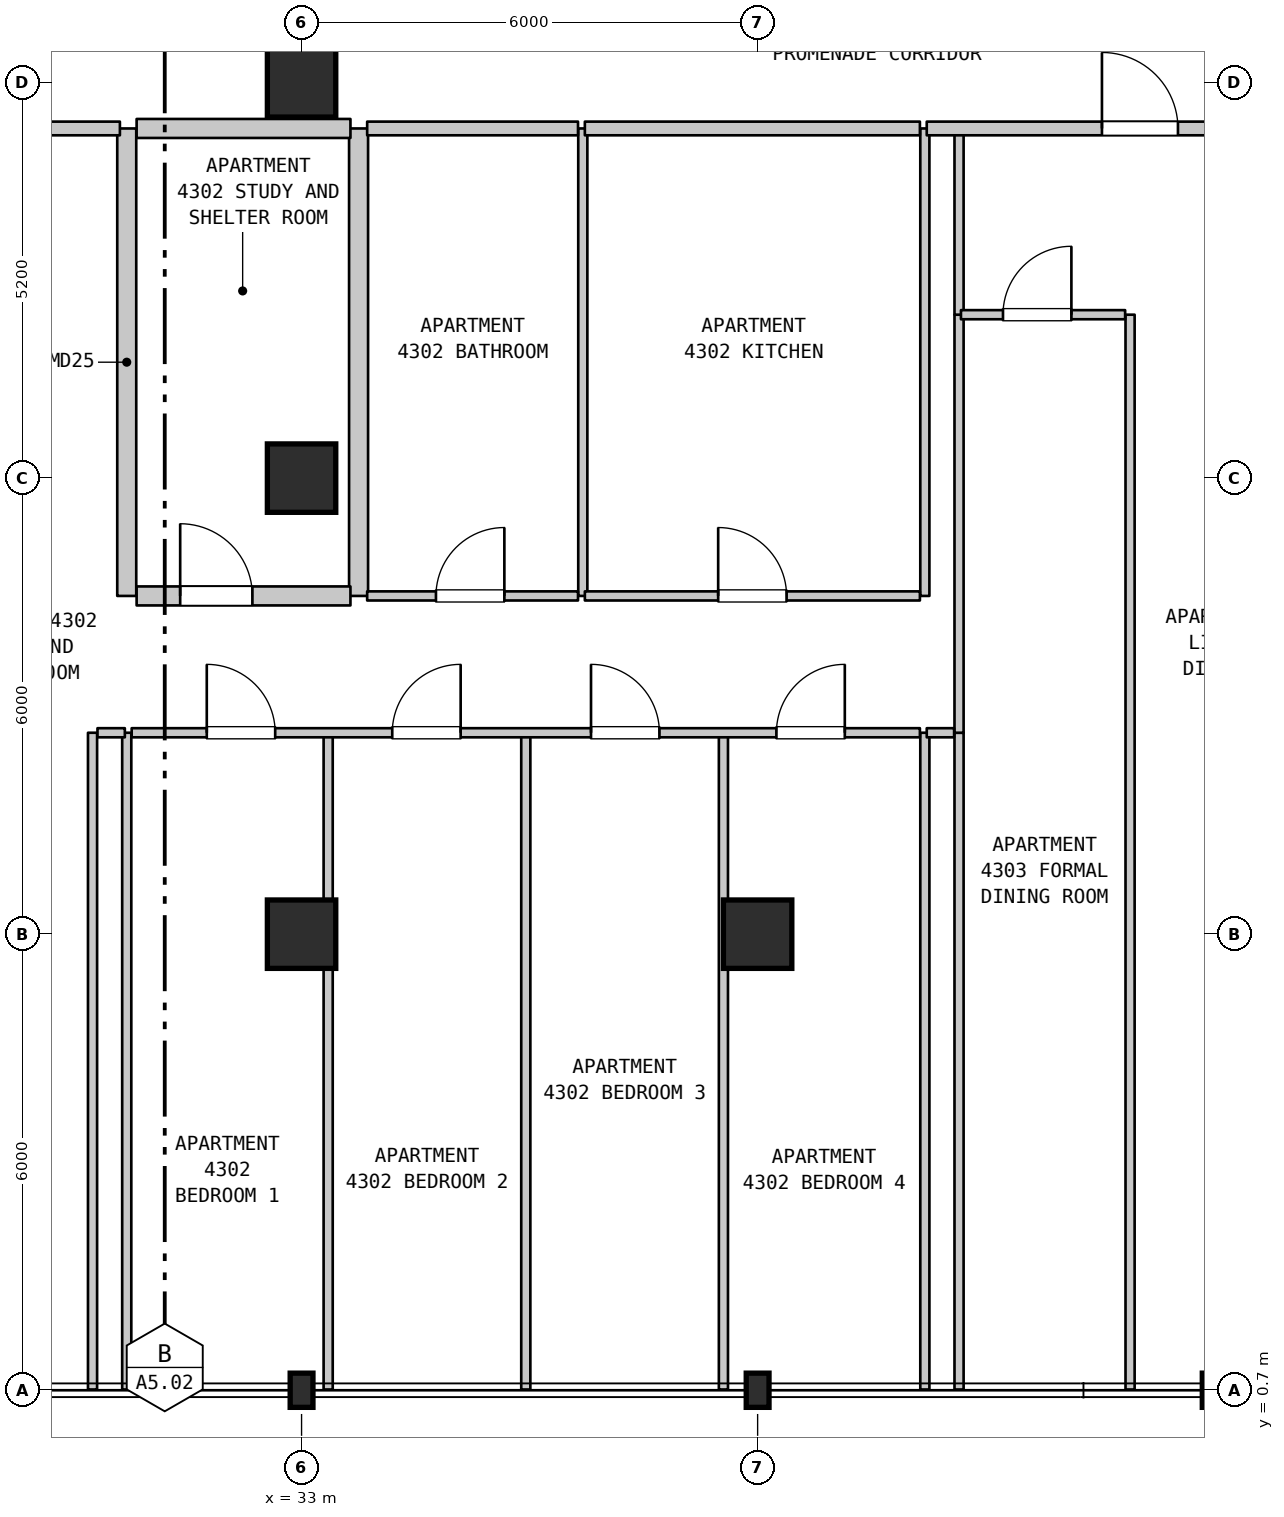
"""IFC4 building model, lengths in metres.
Left out: names, types, materials, properties, quantities, classifications, styles, units other than length and angle.
Written with IfcOpenShell. Run it as: python <this file> out.ifc"""

import sys

from ifc_helpers import new_model, si_unit, direction, frame, frame_2d, origin, origin_2d, place, context, subcontext, project, spatial, rectangle, i_section, extrude, element, fill, save


model = new_model("IFC4")
c1 = context("Model", 3, precision=1e-05, world=origin(), true_north=direction((0.0, 1.0)))
c2 = subcontext(c1, "Body", "Model", "MODEL_VIEW")
j1 = project(units=[si_unit("LENGTHUNIT", "METRE"), si_unit("PLANEANGLEUNIT", "RADIAN")], contexts=[c1])
p1 = place(None, origin())
s1 = spatial("IfcSite", under=j1, at=p1, CompositionType="ELEMENT")
p2 = place(p1, origin())
s2 = spatial("IfcBuilding", under=s1, at=p2, CompositionType="ELEMENT")
p3 = place(p2, frame((0.0, 0.0, 176.5)))
s3 = spatial("IfcBuildingStorey", under=s2, at=p3, CompositionType="ELEMENT", Elevation=176.5)
p4 = place(p3, frame((33.0, 0.7, 0.0), z_axis=(0.0, 0.0, 1.0), x_axis=(1.0, 0.0, 0.0)))
e1 = element("IfcColumn", 1, at=p4, inside=s3, PredefinedType="COLUMN", context=c2, shape_type="SweptSolid", body=[
    extrude(i_section(OverallWidth=0.3, OverallDepth=0.45, WebThickness=0.014, FlangeThickness=0.026, FilletRadius=0.027, at=origin_2d()), origin(), (0.0, 0.0, 1.0), 3.7),
])
for number, where, z_axis, x_axis in (
    (2, (33.0, 6.7, 0.0), (0.0, 0.0, 1.0), (1.0, 0.0, 0.0)),
    (3, (33.0, 12.7, 0.0), (0.0, 0.0, 1.0), (1.0, 0.0, 0.0)),
    (4, (33.0, 17.9, 0.0), (0.0, 0.0, 1.0), (1.0, 0.0, 0.0)),
):
    element("IfcColumn", number, at=place(p3, frame(where, z_axis=z_axis, x_axis=x_axis)), inside=s3, PredefinedType="COLUMN", context=c2, shape_type="SweptSolid", body=[
        extrude(rectangle(XDim=0.9, YDim=0.9, at=origin_2d()), origin(), (0.0, 0.0, 1.0), 3.7),
    ])
p5 = place(p3, frame((39.0, 0.7, 0.0), z_axis=(0.0, 0.0, 1.0), x_axis=(1.0, 0.0, 0.0)))
e5 = element("IfcColumn", 5, at=p5, inside=s3, PredefinedType="COLUMN", context=c2, shape_type="SweptSolid", body=[
    extrude(i_section(OverallWidth=0.3, OverallDepth=0.45, WebThickness=0.014, FlangeThickness=0.026, FilletRadius=0.027, at=origin_2d()), origin(), (0.0, 0.0, 1.0), 3.7),
])
p6 = place(p3, frame((39.0, 6.7, 0.0), z_axis=(0.0, 0.0, 1.0), x_axis=(1.0, 0.0, 0.0)))
e6 = element("IfcColumn", 6, at=p6, inside=s3, PredefinedType="COLUMN", context=c2, shape_type="SweptSolid", body=[
    extrude(rectangle(XDim=0.9, YDim=0.9, at=origin_2d()), origin(), (0.0, 0.0, 1.0), 3.7),
])
p7 = place(p3, frame((45.0, 0.7, 0.0), z_axis=(0.0, 0.0, 1.0), x_axis=(1.0, 0.0, 0.0)))
e7 = element("IfcColumn", 7, at=p7, inside=s3, PredefinedType="COLUMN", context=c2, shape_type="SweptSolid", body=[
    extrude(i_section(OverallWidth=0.3, OverallDepth=0.45, WebThickness=0.014, FlangeThickness=0.026, FilletRadius=0.027, at=origin_2d()), origin(), (0.0, 0.0, 1.0), 3.7),
])
for number, where, z_axis, x_axis in (
    (8, (30.25, 0.71, 0.0), (0.0, 0.0, 1.0), (0.0, 1.0, 0.0)),
    (9, (30.7, 0.71, 0.0), (0.0, 0.0, 1.0), (0.0, 1.0, 0.0)),
):
    element("IfcWall", number, at=place(p3, frame(where, z_axis=z_axis, x_axis=x_axis)), inside=s3, PredefinedType="PARTITIONING", context=c2, shape_type="SweptSolid", body=[
        extrude(rectangle(XDim=8.64, YDim=0.12, at=frame_2d((4.32, 0.0))), origin(), (0.0, 0.0, 1.0), 3.39),
    ])
p8 = place(p3, frame((30.7, 11.15, 0.0), z_axis=(0.0, 0.0, 1.0), x_axis=(0.0, 1.0, 0.0)))
e10 = element("IfcWall", 10, at=p8, inside=s3, PredefinedType="STANDARD", context=c2, shape_type="SweptSolid", body=[
    extrude(rectangle(XDim=6.15, YDim=0.25, at=frame_2d((3.075, 0.0))), origin(), (0.0, 0.0, 1.0), 3.39),
])
p9 = place(p3, frame((33.35, 0.71, 0.0), z_axis=(0.0, 0.0, 1.0), x_axis=(0.0, 1.0, 0.0)))
e11 = element("IfcWall", 11, at=p9, inside=s3, PredefinedType="PARTITIONING", context=c2, shape_type="SweptSolid", body=[
    extrude(rectangle(XDim=8.64, YDim=0.12, at=frame_2d((4.32, 0.0))), origin(), (0.0, 0.0, 1.0), 3.39),
])
p10 = place(p3, frame((33.75, 11.15, 0.0), z_axis=(0.0, 0.0, 1.0), x_axis=(0.0, 1.0, 0.0)))
e12 = element("IfcWall", 12, at=p10, inside=s3, PredefinedType="STANDARD", context=c2, shape_type="SweptSolid", body=[
    extrude(rectangle(XDim=6.15, YDim=0.25, at=frame_2d((3.075, 0.0))), origin(), (0.0, 0.0, 1.0), 3.39),
])
p11 = place(p3, frame((35.95, 0.71, 0.0), z_axis=(0.0, 0.0, 1.0), x_axis=(0.0, 1.0, 0.0)))
e13 = element("IfcWall", 13, at=p11, inside=s3, PredefinedType="PARTITIONING", context=c2, shape_type="SweptSolid", body=[
    extrude(rectangle(XDim=8.64, YDim=0.12, at=frame_2d((4.32, 0.0))), origin(), (0.0, 0.0, 1.0), 3.39),
])
p12 = place(p3, frame((36.7, 11.15, 0.0), z_axis=(0.0, 0.0, 1.0), x_axis=(0.0, 1.0, 0.0)))
e14 = element("IfcWall", 14, at=p12, inside=s3, PredefinedType="PARTITIONING", context=c2, shape_type="SweptSolid", body=[
    extrude(rectangle(XDim=6.15, YDim=0.12, at=frame_2d((3.075, 0.0))), origin(), (0.0, 0.0, 1.0), 3.39),
])
for number, where, z_axis, x_axis in (
    (15, (38.55, 0.71, 0.0), (0.0, 0.0, 1.0), (0.0, 1.0, 0.0)),
    (16, (41.2, 0.71, 0.0), (0.0, 0.0, 1.0), (0.0, 1.0, 0.0)),
):
    element("IfcWall", number, at=place(p3, frame(where, z_axis=z_axis, x_axis=x_axis)), inside=s3, PredefinedType="PARTITIONING", context=c2, shape_type="SweptSolid", body=[
        extrude(rectangle(XDim=8.64, YDim=0.12, at=frame_2d((4.32, 0.0))), origin(), (0.0, 0.0, 1.0), 3.39),
    ])
p13 = place(p3, frame((41.2, 11.15, 0.0), z_axis=(0.0, 0.0, 1.0), x_axis=(0.0, 1.0, 0.0)))
e17 = element("IfcWall", 17, at=p13, inside=s3, PredefinedType="PARTITIONING", context=c2, shape_type="SweptSolid", body=[
    extrude(rectangle(XDim=6.15, YDim=0.12, at=frame_2d((3.075, 0.0))), origin(), (0.0, 0.0, 1.0), 3.39),
])
p14 = place(p3, frame((41.65, 0.71, 0.0), z_axis=(0.0, 0.0, 1.0), x_axis=(0.0, 1.0, 0.0)))
e18 = element("IfcWall", 18, at=p14, inside=s3, PredefinedType="PARTITIONING", context=c2, shape_type="SweptSolid", body=[
    extrude(rectangle(XDim=8.64, YDim=0.12, at=frame_2d((4.32, 0.0))), origin(), (0.0, 0.0, 1.0), 3.39),
])
p15 = place(p3, frame((41.65, 9.35, 0.0), z_axis=(0.0, 0.0, 1.0), x_axis=(0.0, 1.0, 0.0)))
e19 = element("IfcWall", 19, at=p15, inside=s3, PredefinedType="PARTITIONING", context=c2, shape_type="SweptSolid", body=[
    extrude(rectangle(XDim=5.5, YDim=0.12, at=frame_2d((2.75, 0.0))), origin(), (0.0, 0.0, 1.0), 3.39),
])
p16 = place(p3, frame((41.65, 14.85, 0.0), z_axis=(0.0, 0.0, 1.0), x_axis=(0.0, 1.0, 0.0)))
e20 = element("IfcWall", 20, at=p16, inside=s3, PredefinedType="PARTITIONING", context=c2, shape_type="SweptSolid", body=[
    extrude(rectangle(XDim=2.45, YDim=0.12, at=frame_2d((1.225, 0.0))), origin(), (0.0, 0.0, 1.0), 3.39),
])
p17 = place(p3, frame((43.9, 0.71, 0.0), z_axis=(0.0, 0.0, 1.0), x_axis=(0.0, 1.0, 0.0)))
e21 = element("IfcWall", 21, at=p17, inside=s3, PredefinedType="PARTITIONING", context=c2, shape_type="SweptSolid", body=[
    extrude(rectangle(XDim=14.14, YDim=0.12, at=frame_2d((7.07, 0.0))), origin(), (0.0, 0.0, 1.0), 3.39),
])
p18 = place(p3, frame((30.315, 9.35, 0.0), z_axis=(0.0, 0.0, 1.0), x_axis=(1.0, 0.0, 0.0)))
e22 = element("IfcWall", 22, at=p18, inside=s3, PredefinedType="PARTITIONING", context=c2, shape_type="SweptSolid", body=[
    extrude(rectangle(XDim=0.36, YDim=0.12, at=frame_2d((0.18, 0.0))), origin(), (0.0, 0.0, 1.0), 3.39),
])
p19 = place(p3, frame((30.765, 9.35, 0.0), z_axis=(0.0, 0.0, 1.0), x_axis=(1.0, 0.0, 0.0)))
e23 = element("IfcWall", 23, at=p19, inside=s3, PredefinedType="PARTITIONING", context=c2, shape_type="SweptSolid", body=[
    extrude(rectangle(XDim=10.37, YDim=0.12, at=frame_2d((5.185, 0.0))), origin(), (0.0, 0.0, 1.0), 3.39),
])
p20 = place(p19, frame((0.988, 0.0, 0.0)))
e24 = element("IfcOpeningElement", 24, at=p20, cuts=e23, PredefinedType="OPENING", context=c2, shape_type="SweptSolid", body=[
    extrude(rectangle(XDim=0.9, YDim=2.15, at=frame_2d((0.45, 1.075))), frame((0.0, 0.07, 0.0), z_axis=(0.0, -1.0, 0.0), x_axis=(1.0, 0.0, 0.0)), (0.0, 0.0, 1.0), 0.14),
])
p21 = place(p19, frame((3.428, 0.0, 0.0)))
e25 = element("IfcOpeningElement", 25, at=p21, cuts=e23, PredefinedType="OPENING", context=c2, shape_type="SweptSolid", body=[
    extrude(rectangle(XDim=0.9, YDim=2.15, at=frame_2d((0.45, 1.075))), frame((0.0, 0.07, 0.0), z_axis=(0.0, -1.0, 0.0), x_axis=(1.0, 0.0, 0.0)), (0.0, 0.0, 1.0), 0.14),
])
p22 = place(p19, frame((6.043, 0.0, 0.0)))
e26 = element("IfcOpeningElement", 26, at=p22, cuts=e23, PredefinedType="OPENING", context=c2, shape_type="SweptSolid", body=[
    extrude(rectangle(XDim=0.9, YDim=2.15, at=frame_2d((0.45, 1.075))), frame((0.0, 0.07, 0.0), z_axis=(0.0, -1.0, 0.0), x_axis=(1.0, 0.0, 0.0)), (0.0, 0.0, 1.0), 0.14),
])
p23 = place(p19, frame((8.482, 0.0, 0.0)))
e27 = element("IfcOpeningElement", 27, at=p23, cuts=e23, PredefinedType="OPENING", context=c2, shape_type="SweptSolid", body=[
    extrude(rectangle(XDim=0.9, YDim=2.15, at=frame_2d((0.45, 1.075))), frame((0.0, 0.07, 0.0), z_axis=(0.0, -1.0, 0.0), x_axis=(1.0, 0.0, 0.0)), (0.0, 0.0, 1.0), 0.14),
])
p24 = place(p3, frame((41.225, 9.35, 0.0), z_axis=(0.0, 0.0, 1.0), x_axis=(1.0, 0.0, 0.0)))
e28 = element("IfcWall", 28, at=p24, inside=s3, PredefinedType="PARTITIONING", context=c2, shape_type="SweptSolid", body=[
    extrude(rectangle(XDim=0.36, YDim=0.12, at=frame_2d((0.18, 0.0))), origin(), (0.0, 0.0, 1.0), 3.39),
])
p25 = place(p3, frame((30.83, 11.15, 0.0), z_axis=(0.0, 0.0, 1.0), x_axis=(1.0, 0.0, 0.0)))
e29 = element("IfcWall", 29, at=p25, inside=s3, PredefinedType="STANDARD", context=c2, shape_type="SweptSolid", body=[
    extrude(rectangle(XDim=2.813, YDim=0.25, at=frame_2d((1.406, 0.0))), origin(), (0.0, 0.0, 1.0), 3.39),
])
p26 = place(p25, frame((0.573, 0.0, 0.0)))
e30 = element("IfcOpeningElement", 30, at=p26, cuts=e29, PredefinedType="OPENING", context=c2, shape_type="SweptSolid", body=[
    extrude(rectangle(XDim=0.95, YDim=2.15, at=frame_2d((0.475, 1.075))), frame((0.0, 0.135, 0.0), z_axis=(0.0, -1.0, 0.0), x_axis=(1.0, 0.0, 0.0)), (0.0, 0.0, 1.0), 0.27),
])
p27 = place(p3, frame((33.863, 11.15, 0.0), z_axis=(0.0, 0.0, 1.0), x_axis=(1.0, 0.0, 0.0)))
e31 = element("IfcWall", 31, at=p27, inside=s3, PredefinedType="PARTITIONING", context=c2, shape_type="SweptSolid", body=[
    extrude(rectangle(XDim=2.774, YDim=0.12, at=frame_2d((1.387, 0.0))), origin(), (0.0, 0.0, 1.0), 3.39),
])
p28 = place(p27, frame((0.905, 0.0, 0.0)))
e32 = element("IfcOpeningElement", 32, at=p28, cuts=e31, PredefinedType="OPENING", context=c2, shape_type="SweptSolid", body=[
    extrude(rectangle(XDim=0.9, YDim=2.1, at=frame_2d((0.45, 1.05))), frame((0.0, 0.07, 0.0), z_axis=(0.0, -1.0, 0.0), x_axis=(1.0, 0.0, 0.0)), (0.0, 0.0, 1.0), 0.14),
])
p29 = place(p3, frame((36.727, 11.15, 0.0), z_axis=(0.0, 0.0, 1.0), x_axis=(1.0, 0.0, 0.0)))
e33 = element("IfcWall", 33, at=p29, inside=s3, PredefinedType="PARTITIONING", context=c2, shape_type="SweptSolid", body=[
    extrude(rectangle(XDim=4.408, YDim=0.12, at=frame_2d((2.204, 0.0))), origin(), (0.0, 0.0, 1.0), 3.39),
])
p30 = place(p29, frame((1.754, 0.0, 0.0)))
e34 = element("IfcOpeningElement", 34, at=p30, cuts=e33, PredefinedType="OPENING", context=c2, shape_type="SweptSolid", body=[
    extrude(rectangle(XDim=0.9, YDim=2.15, at=frame_2d((0.45, 1.075))), frame((0.0, 0.07, 0.0), z_axis=(0.0, -1.0, 0.0), x_axis=(1.0, 0.0, 0.0)), (0.0, 0.0, 1.0), 0.14),
])
p31 = place(p3, frame((41.675, 14.85, 0.0), z_axis=(0.0, 0.0, 1.0), x_axis=(1.0, 0.0, 0.0)))
e35 = element("IfcWall", 35, at=p31, inside=s3, PredefinedType="PARTITIONING", context=c2, shape_type="SweptSolid", body=[
    extrude(rectangle(XDim=2.16, YDim=0.12, at=frame_2d((1.08, 0.0))), origin(), (0.0, 0.0, 1.0), 3.39),
])
p32 = place(p31, frame((0.553, 0.0, 0.0)))
e36 = element("IfcOpeningElement", 36, at=p32, cuts=e35, PredefinedType="OPENING", context=c2, shape_type="SweptSolid", body=[
    extrude(rectangle(XDim=0.9, YDim=2.15, at=frame_2d((0.45, 1.075))), frame((0.0, 0.07, 0.0), z_axis=(0.0, -1.0, 0.0), x_axis=(1.0, 0.0, 0.0)), (0.0, 0.0, 1.0), 0.14),
])
p33 = place(p3, frame((25.515, 17.3, 0.0), z_axis=(0.0, 0.0, 1.0), x_axis=(1.0, 0.0, 0.0)))
e37 = element("IfcWall", 37, at=p33, inside=s3, PredefinedType="STANDARD", context=c2, shape_type="SweptSolid", body=[
    extrude(rectangle(XDim=5.095, YDim=0.18, at=frame_2d((2.548, 0.0))), origin(), (0.0, 0.0, 1.0), 3.39),
])
p34 = place(p33, frame((2.08, 0.0, 0.0)))
e38 = element("IfcOpeningElement", 38, at=p34, cuts=e37, PredefinedType="OPENING", context=c2, shape_type="SweptSolid", body=[
    extrude(rectangle(XDim=1.0, YDim=2.15, at=frame_2d((0.5, 1.075))), frame((0.0, 0.1, 0.0), z_axis=(0.0, -1.0, 0.0), x_axis=(1.0, 0.0, 0.0)), (0.0, 0.0, 1.0), 0.2),
])
p35 = place(p3, frame((30.83, 17.3, 0.0), z_axis=(0.0, 0.0, 1.0), x_axis=(1.0, 0.0, 0.0)))
e39 = element("IfcWall", 39, at=p35, inside=s3, PredefinedType="STANDARD", context=c2, shape_type="SweptSolid", body=[
    extrude(rectangle(XDim=2.813, YDim=0.25, at=frame_2d((1.406, 0.0))), origin(), (0.0, 0.0, 1.0), 3.39),
])
p36 = place(p3, frame((33.863, 17.3, 0.0), z_axis=(0.0, 0.0, 1.0), x_axis=(1.0, 0.0, 0.0)))
e40 = element("IfcWall", 40, at=p36, inside=s3, PredefinedType="STANDARD", context=c2, shape_type="SweptSolid", body=[
    extrude(rectangle(XDim=2.774, YDim=0.18, at=frame_2d((1.387, 0.0))), origin(), (0.0, 0.0, 1.0), 3.39),
])
p37 = place(p3, frame((36.727, 17.3, 0.0), z_axis=(0.0, 0.0, 1.0), x_axis=(1.0, 0.0, 0.0)))
e41 = element("IfcWall", 41, at=p37, inside=s3, PredefinedType="STANDARD", context=c2, shape_type="SweptSolid", body=[
    extrude(rectangle(XDim=4.408, YDim=0.18, at=frame_2d((2.204, 0.0))), origin(), (0.0, 0.0, 1.0), 3.39),
])
p38 = place(p3, frame((41.225, 17.3, 0.0), z_axis=(0.0, 0.0, 1.0), x_axis=(1.0, 0.0, 0.0)))
e42 = element("IfcWall", 42, at=p38, inside=s3, PredefinedType="STANDARD", context=c2, shape_type="SweptSolid", body=[
    extrude(rectangle(XDim=5.545, YDim=0.18, at=frame_2d((2.772, 0.0))), origin(), (0.0, 0.0, 1.0), 3.39),
])
p39 = place(p38, frame((2.305, 0.0, 0.0)))
e43 = element("IfcOpeningElement", 43, at=p39, cuts=e42, PredefinedType="OPENING", context=c2, shape_type="SweptSolid", body=[
    extrude(rectangle(XDim=1.0, YDim=2.15, at=frame_2d((0.5, 1.075))), frame((0.0, 0.1, 0.0), z_axis=(0.0, -1.0, 0.0), x_axis=(1.0, 0.0, 0.0)), (0.0, 0.0, 1.0), 0.2),
])
p40 = place(p20, origin())
e44 = element("IfcDoor", 44, at=p40, inside=s3, OperationType="SINGLE_SWING_LEFT", PredefinedType="DOOR", context=c2, shape_type="SweptSolid", body=[
    extrude(rectangle(XDim=0.9, YDim=2.15, at=frame_2d((0.45, 1.075))), frame((0.0, 0.025, 0.0), z_axis=(0.0, -1.0, 0.0), x_axis=(1.0, 0.0, 0.0)), (0.0, 0.0, 1.0), 0.05),
])
fill(e24, e44)
p41 = place(p21, origin())
e45 = element("IfcDoor", 45, at=p41, inside=s3, OperationType="SINGLE_SWING_RIGHT", PredefinedType="DOOR", context=c2, shape_type="SweptSolid", body=[
    extrude(rectangle(XDim=0.9, YDim=2.15, at=frame_2d((0.45, 1.075))), frame((0.0, 0.025, 0.0), z_axis=(0.0, -1.0, 0.0), x_axis=(1.0, 0.0, 0.0)), (0.0, 0.0, 1.0), 0.05),
])
fill(e25, e45)
p42 = place(p22, origin())
e46 = element("IfcDoor", 46, at=p42, inside=s3, OperationType="SINGLE_SWING_LEFT", PredefinedType="DOOR", context=c2, shape_type="SweptSolid", body=[
    extrude(rectangle(XDim=0.9, YDim=2.15, at=frame_2d((0.45, 1.075))), frame((0.0, 0.025, 0.0), z_axis=(0.0, -1.0, 0.0), x_axis=(1.0, 0.0, 0.0)), (0.0, 0.0, 1.0), 0.05),
])
fill(e26, e46)
p43 = place(p23, origin())
e47 = element("IfcDoor", 47, at=p43, inside=s3, OperationType="SINGLE_SWING_RIGHT", PredefinedType="DOOR", context=c2, shape_type="SweptSolid", body=[
    extrude(rectangle(XDim=0.9, YDim=2.15, at=frame_2d((0.45, 1.075))), frame((0.0, 0.025, 0.0), z_axis=(0.0, -1.0, 0.0), x_axis=(1.0, 0.0, 0.0)), (0.0, 0.0, 1.0), 0.05),
])
fill(e27, e47)
p44 = place(p26, origin())
e48 = element("IfcDoor", 48, at=p44, inside=s3, OperationType="SINGLE_SWING_LEFT", PredefinedType="DOOR", context=c2, shape_type="SweptSolid", body=[
    extrude(rectangle(XDim=0.95, YDim=2.15, at=frame_2d((0.475, 1.075))), frame((0.0, 0.025, 0.0), z_axis=(0.0, -1.0, 0.0), x_axis=(1.0, 0.0, 0.0)), (0.0, 0.0, 1.0), 0.05),
])
fill(e30, e48)
p45 = place(p28, origin())
e49 = element("IfcDoor", 49, at=p45, inside=s3, OperationType="SINGLE_SWING_RIGHT", PredefinedType="DOOR", context=c2, shape_type="SweptSolid", body=[
    extrude(rectangle(XDim=0.9, YDim=2.1, at=frame_2d((0.45, 1.05))), frame((0.0, 0.025, 0.0), z_axis=(0.0, -1.0, 0.0), x_axis=(1.0, 0.0, 0.0)), (0.0, 0.0, 1.0), 0.05),
])
fill(e32, e49)
p46 = place(p30, origin())
e50 = element("IfcDoor", 50, at=p46, inside=s3, OperationType="SINGLE_SWING_LEFT", PredefinedType="DOOR", context=c2, shape_type="SweptSolid", body=[
    extrude(rectangle(XDim=0.9, YDim=2.15, at=frame_2d((0.45, 1.075))), frame((0.0, 0.025, 0.0), z_axis=(0.0, -1.0, 0.0), x_axis=(1.0, 0.0, 0.0)), (0.0, 0.0, 1.0), 0.05),
])
fill(e34, e50)
p47 = place(p32, origin())
e51 = element("IfcDoor", 51, at=p47, inside=s3, OperationType="SINGLE_SWING_RIGHT", PredefinedType="DOOR", context=c2, shape_type="SweptSolid", body=[
    extrude(rectangle(XDim=0.9, YDim=2.15, at=frame_2d((0.45, 1.075))), frame((0.0, 0.025, 0.0), z_axis=(0.0, -1.0, 0.0), x_axis=(1.0, 0.0, 0.0)), (0.0, 0.0, 1.0), 0.05),
])
fill(e36, e51)
p48 = place(p39, origin())
e52 = element("IfcDoor", 52, at=p48, inside=s3, OperationType="SINGLE_SWING_LEFT", PredefinedType="DOOR", context=c2, shape_type="SweptSolid", body=[
    extrude(rectangle(XDim=1.0, YDim=2.15, at=frame_2d((0.5, 1.075))), frame((0.0, 0.025, 0.0), z_axis=(0.0, -1.0, 0.0), x_axis=(1.0, 0.0, 0.0)), (0.0, 0.0, 1.0), 0.05),
])
fill(e43, e52)
save(model, sys.argv[1])
